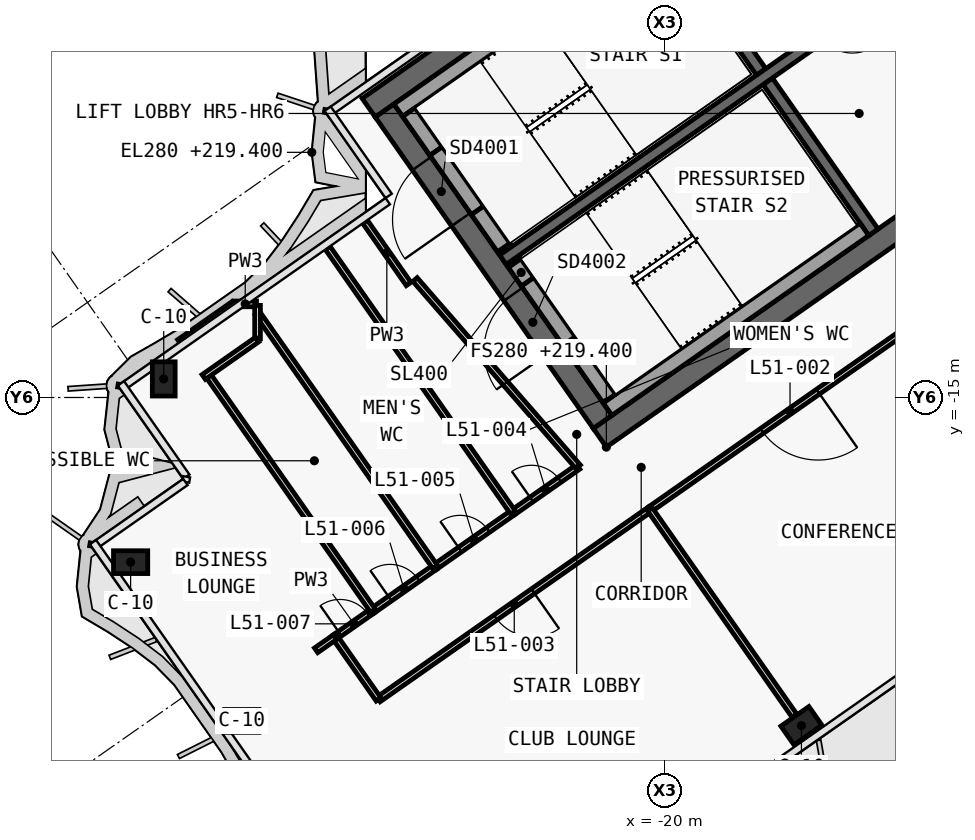
"""IFC4 building model, lengths in metres.
Left out: names, types, materials, properties, quantities, classifications, styles, units other than length and angle.
Written with IfcOpenShell. Run it as: python <this file> out.ifc"""

import sys

from ifc_helpers import new_model, si_unit, direction, frame, frame_2d, origin, origin_2d, place, context, subcontext, project, spatial, polyline, rectangle, outline, extrude, clip, halfspace, element, fill, save


model = new_model("IFC4")
c1 = context("Model", 3, precision=1e-05, world=origin(), true_north=direction((0.0, 1.0)))
c2 = subcontext(c1, "Body", "Model", "MODEL_VIEW")
j1 = project(units=[si_unit("LENGTHUNIT", "METRE"), si_unit("PLANEANGLEUNIT", "RADIAN")], contexts=[c1])
p1 = place(None, origin())
s1 = spatial("IfcSite", under=j1, at=p1, CompositionType="ELEMENT")
p2 = place(p1, origin())
s2 = spatial("IfcBuilding", under=s1, at=p2, CompositionType="ELEMENT")
p3 = place(p2, frame((0.0, 0.0, 219.4)))
s3 = spatial("IfcBuildingStorey", under=s2, at=p3, CompositionType="ELEMENT", Elevation=219.4)
p4 = place(p3, frame((-0.028, 12.066, 0.0), z_axis=(0.0, 0.0, 1.0), x_axis=(-0.819151382952, -0.573577380837, 0.0)))
e1 = element("IfcWall", 1, at=p4, inside=s3, PredefinedType="SHEAR", context=c2, shape_type="SweptSolid", body=[
    extrude(outline(polyline([(33.898, 0.3), (0.42, 0.3), (0.0, -0.3), (33.898, -0.3), (33.898, 0.3)])), origin(), (0.0, 0.0, 1.0), 6.0),
])
p5 = place(p3, frame((-0.028, -0.874, 0.0), z_axis=(0.0, 0.0, 1.0), x_axis=(-0.819150035022, -0.573579305871, 0.0)))
e2 = element("IfcWall", 2, at=p5, inside=s3, PredefinedType="SHEAR", context=c2, shape_type="SweptSolid", body=[
    extrude(outline(polyline([(26.476, 0.3), (0.42, 0.3), (0.0, -0.3), (26.476, -0.3), (26.476, 0.3)])), origin(), (0.0, 0.0, 1.0), 6.0),
])
p6 = place(p5, frame((2.976, 0.0, 0.0)))
e3 = element("IfcOpeningElement", 3, at=p6, cuts=e2, PredefinedType="OPENING", context=c2, shape_type="SweptSolid", body=[
    extrude(rectangle(XDim=2.4, YDim=2.1, at=frame_2d((1.2, 1.05))), frame((0.0, 0.31, 0.0), z_axis=(0.0, -1.0, 0.0), x_axis=(1.0, 0.0, 0.0)), (0.0, 0.0, 1.0), 0.62),
])
p7 = place(p5, frame((11.776, 0.0, 0.0)))
e4 = element("IfcOpeningElement", 4, at=p7, cuts=e2, PredefinedType="OPENING", context=c2, shape_type="SweptSolid", body=[
    extrude(rectangle(XDim=2.4, YDim=2.1, at=frame_2d((1.2, 1.05))), frame((0.0, 0.31, 0.0), z_axis=(0.0, -1.0, 0.0), x_axis=(1.0, 0.0, 0.0)), (0.0, 0.0, 1.0), 0.62),
])
p8 = place(p3, frame((-21.642, -15.642, 0.0), z_axis=(0.0, 0.0, 1.0), x_axis=(-0.573586866468, 0.819144740944, 0.0)))
e5 = element("IfcWall", 5, at=p8, inside=s3, PredefinedType="SHEAR", context=c2, shape_type="SweptSolid", body=[
    extrude(outline(polyline([(0.0, 0.3), (0.0, -0.3), (10.0, -0.3), (10.0, 0.3), (0.0, 0.3)])), origin(), (0.0, 0.0, 1.0), 6.0),
])
p9 = place(p8, frame((6.5, 0.0, 0.0)))
e6 = element("IfcOpeningElement", 6, at=p9, cuts=e5, PredefinedType="OPENING", context=c2, shape_type="SweptSolid", body=[
    extrude(rectangle(XDim=1.8, YDim=2.1, at=frame_2d((0.9, 1.05))), frame((0.0, 0.31, 0.0), z_axis=(0.0, -1.0, 0.0), x_axis=(1.0, 0.0, 0.0)), (0.0, 0.0, 1.0), 0.62),
])
p10 = place(p8, frame((2.3, 0.0, 0.0)))
e7 = element("IfcOpeningElement", 7, at=p10, cuts=e5, PredefinedType="OPENING", context=c2, shape_type="SweptSolid", body=[
    extrude(rectangle(XDim=1.8, YDim=2.1, at=frame_2d((0.9, 1.05))), frame((0.0, 0.31, 0.0), z_axis=(0.0, -1.0, 0.0), x_axis=(1.0, 0.0, 0.0)), (0.0, 0.0, 1.0), 0.62),
])
p11 = place(p3, frame((-14.515, -10.652, 0.0), z_axis=(0.0, 0.0, 1.0), x_axis=(-0.573560315113, 0.819163332265, 0.0)))
e8 = element("IfcWall", 8, at=p11, inside=s3, PredefinedType="SHEAR", context=c2, shape_type="SweptSolid", body=[
    extrude(outline(polyline([(4.85, 0.15), (0.0, 0.15), (0.0, -0.15), (4.85, -0.15), (4.85, 0.15)])), origin(), (0.0, 0.0, 1.0), 6.0),
])
p12 = place(p3, frame((-17.469, -6.433, 0.0), z_axis=(0.0, 0.0, 1.0), x_axis=(-0.573594092424, 0.81913968109, 0.0)))
e9 = element("IfcWall", 9, at=p12, inside=s3, PredefinedType="SHEAR", context=c2, shape_type="SweptSolid", body=[
    extrude(outline(polyline([(4.85, -0.15), (4.85, 0.15), (0.0, 0.15), (0.0, -0.15), (4.85, -0.15)])), origin(), (0.0, 0.0, 1.0), 6.0),
])
p13 = place(p3, frame((-2.638, 3.768, 0.0), z_axis=(0.0, 0.0, 1.0), x_axis=(-0.819155014212, -0.573572194837, 0.0)))
e10 = element("IfcWall", 10, at=p13, inside=s3, PredefinedType="SHEAR", context=c2, shape_type="SweptSolid", body=[
    extrude(outline(polyline([(26.4, 0.15), (0.0, 0.15), (0.0, -0.15), (26.4, -0.15), (26.4, 0.15)])), origin(), (0.0, 0.0, 1.0), 6.0),
])
p14 = place(p13, frame((1.169, 0.0, 0.0)))
e11 = element("IfcOpeningElement", 11, at=p14, cuts=e10, PredefinedType="OPENING", context=c2, shape_type="SweptSolid", body=[
    extrude(rectangle(XDim=1.1, YDim=2.1, at=frame_2d((0.55, 1.05))), frame((0.0, 0.16, 0.0), z_axis=(0.0, -1.0, 0.0), x_axis=(1.0, 0.0, 0.0)), (0.0, 0.0, 1.0), 0.32),
])
p15 = place(p13, frame((3.206, 0.0, 0.0)))
e12 = element("IfcOpeningElement", 12, at=p15, cuts=e10, PredefinedType="OPENING", context=c2, shape_type="SweptSolid", body=[
    extrude(rectangle(XDim=1.1, YDim=2.1, at=frame_2d((0.55, 1.05))), frame((0.0, 0.16, 0.0), z_axis=(0.0, -1.0, 0.0), x_axis=(1.0, 0.0, 0.0)), (0.0, 0.0, 1.0), 0.32),
])
p16 = place(p13, frame((5.244, 0.0, 0.0)))
e13 = element("IfcOpeningElement", 13, at=p16, cuts=e10, PredefinedType="OPENING", context=c2, shape_type="SweptSolid", body=[
    extrude(rectangle(XDim=1.1, YDim=2.1, at=frame_2d((0.55, 1.05))), frame((0.0, 0.16, 0.0), z_axis=(0.0, -1.0, 0.0), x_axis=(1.0, 0.0, 0.0)), (0.0, 0.0, 1.0), 0.32),
])
p17 = place(p13, frame((7.281, 0.0, 0.0)))
e14 = element("IfcOpeningElement", 14, at=p17, cuts=e10, PredefinedType="OPENING", context=c2, shape_type="SweptSolid", body=[
    extrude(rectangle(XDim=1.1, YDim=2.1, at=frame_2d((0.55, 1.05))), frame((0.0, 0.16, 0.0), z_axis=(0.0, -1.0, 0.0), x_axis=(1.0, 0.0, 0.0)), (0.0, 0.0, 1.0), 0.32),
])
p18 = place(p13, frame((9.688, 0.0, 0.0)))
e15 = element("IfcOpeningElement", 15, at=p18, cuts=e10, PredefinedType="OPENING", context=c2, shape_type="SweptSolid", body=[
    extrude(rectangle(XDim=1.1, YDim=2.1, at=frame_2d((0.55, 1.05))), frame((0.0, 0.16, 0.0), z_axis=(0.0, -1.0, 0.0), x_axis=(1.0, 0.0, 0.0)), (0.0, 0.0, 1.0), 0.32),
])
p19 = place(p13, frame((11.863, 0.0, 0.0)))
e16 = element("IfcOpeningElement", 16, at=p19, cuts=e10, PredefinedType="OPENING", context=c2, shape_type="SweptSolid", body=[
    extrude(rectangle(XDim=1.1, YDim=2.1, at=frame_2d((0.55, 1.05))), frame((0.0, 0.16, 0.0), z_axis=(0.0, -1.0, 0.0), x_axis=(1.0, 0.0, 0.0)), (0.0, 0.0, 1.0), 0.32),
])
p20 = place(p13, frame((15.175, 0.0, 0.0)))
e17 = element("IfcOpeningElement", 17, at=p20, cuts=e10, PredefinedType="OPENING", context=c2, shape_type="SweptSolid", body=[
    extrude(rectangle(XDim=1.0, YDim=2.1, at=frame_2d((0.5, 1.05))), frame((0.0, 0.16, 0.0), z_axis=(0.0, -1.0, 0.0), x_axis=(1.0, 0.0, 0.0)), (0.0, 0.0, 1.0), 0.32),
])
p21 = place(p3, frame((-16.41, -23.637, 0.0), z_axis=(0.0, 0.0, 1.0), x_axis=(-0.819152044289, -0.573576436351, 0.0)))
e18 = element("IfcColumn", 18, at=p21, inside=s3, PredefinedType="COLUMN", context=c2, shape_type="SweptSolid", body=[
    extrude(rectangle(XDim=0.9, YDim=0.6, at=origin_2d()), origin(), (0.0, 0.0, 1.0), 6.0),
])
p22 = place(p3, frame((-33.263, -14.562, 0.0), z_axis=(0.346416621851, 0.242558564294, 0.906179268684), x_axis=(-0.742303599802, -0.519755935718, 0.422893760899)))
e19 = element("IfcColumn", 19, at=p22, inside=s3, PredefinedType="COLUMN", context=c2, shape_type="Clipping", body=[
    clip(clip(extrude(rectangle(XDim=0.9, YDim=0.6, at=origin_2d()), origin(), (0.0, 0.0, 1.0), 6.621), halfspace(frame((0.0, 0.0, 0.21), z_axis=(0.0, 0.0, 1.0), x_axis=(1.0, 0.0, 0.0)), True)), halfspace(frame((0.0, 0.0, 6.411), z_axis=(0.0, 0.0, 1.0), x_axis=(1.0, 0.0, 0.0)), False)),
])
p23 = place(p3, frame((-31.185, -23.545, 0.0), z_axis=(0.346424451196, 0.242551016063, 0.906178296044), x_axis=(-0.573547881563, 0.819172037825, 0.0)))
e20 = element("IfcColumn", 20, at=p23, inside=s3, PredefinedType="COLUMN", context=c2, shape_type="Clipping", body=[
    clip(clip(extrude(rectangle(XDim=0.9, YDim=0.6, at=origin_2d()), origin(), (0.0, 0.0, 1.0), 6.621), halfspace(frame((0.0, 0.0, 0.14), z_axis=(0.0, 0.0, 1.0), x_axis=(1.0, 0.0, 0.0)), True)), halfspace(frame((0.0, 0.0, 6.481), z_axis=(0.0, 0.0, 1.0), x_axis=(1.0, 0.0, 0.0)), False)),
])
p24 = place(p3, frame((-34.11, -19.367, 0.0), z_axis=(0.346390570757, 0.242554250947, 0.906190381674), x_axis=(-0.573590657386, 0.819142086429, 0.0)))
e21 = element("IfcColumn", 21, at=p24, inside=s3, PredefinedType="COLUMN", context=c2, shape_type="Clipping", body=[
    clip(clip(extrude(rectangle(XDim=0.9, YDim=0.6, at=origin_2d()), origin(), (0.0, 0.0, 1.0), 6.621), halfspace(frame((0.0, 0.0, 0.14), z_axis=(0.0, 0.0, 1.0), x_axis=(1.0, 0.0, 0.0)), True)), halfspace(frame((0.0, 0.0, 6.481), z_axis=(0.0, 0.0, 1.0), x_axis=(1.0, 0.0, 0.0)), False)),
])
p25 = place(p3, frame((-20.259, -2.71, 0.0), z_axis=(0.0, 0.0, 1.0), x_axis=(-0.81914849389, -0.573581506813, 0.0)))
e22 = element("IfcWall", 22, at=p25, inside=s3, PredefinedType="SOLIDWALL", context=c2, shape_type="SweptSolid", body=[
    extrude(rectangle(XDim=8.25, YDim=0.4, at=frame_2d((4.125, 0.0))), origin(), (0.0, 0.0, 1.0), 5.72),
])
p26 = place(p3, frame((-24.244, -11.055, 0.0), z_axis=(0.0, 0.0, 1.0), x_axis=(-0.573571582932, 0.819155442668, 0.0)))
e23 = element("IfcWall", 23, at=p26, inside=s3, PredefinedType="SOLIDWALL", context=c2, shape_type="SweptSolid", body=[
    extrude(rectangle(XDim=1.2, YDim=0.4, at=frame_2d((0.6, 0.0))), origin(), (0.0, 0.0, 1.0), 5.72),
])
p27 = place(p3, frame((-26.022, -8.515, 0.0), z_axis=(0.0, 0.0, 1.0), x_axis=(-0.573619628835, 0.819121798889, 0.0)))
e24 = element("IfcWall", 24, at=p27, inside=s3, PredefinedType="SOLIDWALL", context=c2, shape_type="SweptSolid", body=[
    extrude(rectangle(XDim=1.25, YDim=0.4, at=frame_2d((0.625, 0.0))), origin(), (0.0, 0.0, 1.0), 5.72),
])
p28 = place(p3, frame((-24.932, -10.072, 2.15), z_axis=(0.0, 0.0, 1.0), x_axis=(-0.573591692345, 0.819141361715, 0.0)))
e25 = element("IfcWall", 25, at=p28, inside=s3, PredefinedType="SOLIDWALL", context=c2, shape_type="SweptSolid", body=[
    extrude(rectangle(XDim=1.9, YDim=0.4, at=frame_2d((0.95, 0.0))), origin(), (0.0, 0.0, 1.0), 3.57),
])
p29 = place(p3, frame((-14.753, -10.574, 0.0), z_axis=(0.0, 0.0, 1.0), x_axis=(-0.819158229677, -0.573567602601, 0.0)))
e26 = element("IfcWall", 26, at=p29, inside=s3, PredefinedType="SOLIDWALL", context=c2, shape_type="SweptSolid", body=[
    extrude(rectangle(XDim=8.25, YDim=0.4, at=frame_2d((4.125, 0.0))), origin(), (0.0, 0.0, 1.0), 5.72),
])
p30 = place(p3, frame((-21.462, -15.028, 0.0), z_axis=(0.0, 0.0, 1.0), x_axis=(-0.573559770908, 0.819163713305, 0.0)))
e27 = element("IfcWall", 27, at=p30, inside=s3, PredefinedType="SOLIDWALL", context=c2, shape_type="SweptSolid", body=[
    extrude(rectangle(XDim=1.85, YDim=0.4, at=frame_2d((0.925, 0.0))), origin(), (0.0, 0.0, 1.0), 5.72),
])
p31 = place(p3, frame((-23.613, -11.956, 0.0), z_axis=(0.0, 0.0, 1.0), x_axis=(-0.573435029941, 0.819251039936, 0.0)))
e28 = element("IfcWall", 28, at=p31, inside=s3, PredefinedType="SOLIDWALL", context=c2, shape_type="SweptSolid", body=[
    extrude(rectangle(XDim=0.6, YDim=0.4, at=frame_2d((0.3, 0.0))), origin(), (0.0, 0.0, 1.0), 5.72),
])
p32 = place(p3, frame((-22.523, -13.512, 2.15), z_axis=(0.0, 0.0, 1.0), x_axis=(-0.573591692345, 0.819141361715, 0.0)))
e29 = element("IfcWall", 29, at=p32, inside=s3, PredefinedType="SOLIDWALL", context=c2, shape_type="SweptSolid", body=[
    extrude(rectangle(XDim=1.9, YDim=0.4, at=frame_2d((0.95, 0.0))), origin(), (0.0, 0.0, 1.0), 3.57),
])
p33 = place(p3, frame((-24.003, -18.028, 0.0), z_axis=(0.0, 0.0, 1.0), x_axis=(0.819182738768, 0.573532597595, 0.0)))
e30 = element("IfcWall", 30, at=p33, inside=s3, PredefinedType="PARTITIONING", context=c2, shape_type="SweptSolid", body=[
    extrude(rectangle(XDim=2.099, YDim=0.15, at=frame_2d((1.05, 0.0))), origin(), (0.0, 0.0, 1.0), 5.72),
])
p34 = place(p33, frame((0.6, 0.0, 0.0)))
e31 = element("IfcOpeningElement", 31, at=p34, cuts=e30, PredefinedType="OPENING", context=c2, shape_type="SweptSolid", body=[
    extrude(rectangle(XDim=0.9, YDim=2.1, at=frame_2d((0.45, 1.05))), frame((0.0, 0.085, 0.0), z_axis=(0.0, -1.0, 0.0), x_axis=(1.0, 0.0, 0.0)), (0.0, 0.0, 1.0), 0.17),
])
p35 = place(p3, frame((-26.051, -19.461, 0.0), z_axis=(0.0, 0.0, 1.0), x_axis=(0.81920443604, 0.573501605902, 0.0)))
e32 = element("IfcWall", 32, at=p35, inside=s3, PredefinedType="PARTITIONING", context=c2, shape_type="SweptSolid", body=[
    extrude(rectangle(XDim=2.504, YDim=0.15, at=frame_2d((1.252, 0.0))), origin(), (0.0, 0.0, 1.0), 5.72),
])
p36 = place(p35, frame((0.802, 0.0, 0.0)))
e33 = element("IfcOpeningElement", 33, at=p36, cuts=e32, PredefinedType="OPENING", context=c2, shape_type="SweptSolid", body=[
    extrude(rectangle(XDim=0.9, YDim=2.1, at=frame_2d((0.45, 1.05))), frame((0.0, 0.085, 0.0), z_axis=(0.0, -1.0, 0.0), x_axis=(1.0, 0.0, 0.0)), (0.0, 0.0, 1.0), 0.17),
])
p37 = place(p3, frame((-27.689, -20.609, 0.0), z_axis=(0.0, 0.0, 1.0), x_axis=(0.819163233777, 0.573560455774, 0.0)))
e34 = element("IfcWall", 34, at=p37, inside=s3, PredefinedType="PARTITIONING", context=c2, shape_type="SweptSolid", body=[
    extrude(rectangle(XDim=2.004, YDim=0.15, at=frame_2d((1.002, 0.0))), origin(), (0.0, 0.0, 1.0), 5.15),
])
p38 = place(p37, frame((0.552, 0.0, 0.0)))
e35 = element("IfcOpeningElement", 35, at=p38, cuts=e34, PredefinedType="OPENING", context=c2, shape_type="SweptSolid", body=[
    extrude(rectangle(XDim=0.9, YDim=2.1, at=frame_2d((0.45, 1.05))), frame((0.0, 0.085, 0.0), z_axis=(0.0, -1.0, 0.0), x_axis=(1.0, 0.0, 0.0)), (0.0, 0.0, 1.0), 0.17),
])
p39 = place(p3, frame((-28.685, -21.306, 0.0), z_axis=(0.0, 0.0, 1.0), x_axis=(0.819184927295, 0.573529471686, 0.0)))
e36 = element("IfcWall", 36, at=p39, inside=s3, PredefinedType="PARTITIONING", context=c2, shape_type="SweptSolid", body=[
    extrude(rectangle(XDim=1.22, YDim=0.15, at=frame_2d((0.61, 0.0))), origin(), (0.0, 0.0, 1.0), 5.72),
])
p40 = place(p39, frame((0.16, 0.0, 0.0)))
e37 = element("IfcOpeningElement", 37, at=p40, cuts=e36, PredefinedType="OPENING", context=c2, shape_type="SweptSolid", body=[
    extrude(rectangle(XDim=0.9, YDim=2.1, at=frame_2d((0.45, 1.05))), frame((0.0, 0.085, 0.0), z_axis=(0.0, -1.0, 0.0), x_axis=(1.0, 0.0, 0.0)), (0.0, 0.0, 1.0), 0.17),
])
p41 = place(p3, frame((-13.022, -12.781, 0.0), z_axis=(0.0, 0.0, 1.0), x_axis=(-0.819142740634, -0.573589723117, 0.0)))
e38 = element("IfcWall", 38, at=p41, inside=s3, PredefinedType="PARTITIONING", context=c2, shape_type="SweptSolid", body=[
    extrude(rectangle(XDim=9.004, YDim=0.15, at=frame_2d((4.502, 0.0))), origin(), (0.0, 0.0, 1.0), 5.15),
])
p42 = place(p41, frame((3.602, 0.0, 0.0)))
e39 = element("IfcOpeningElement", 39, at=p42, cuts=e38, PredefinedType="OPENING", context=c2, shape_type="SweptSolid", body=[
    extrude(rectangle(XDim=1.8, YDim=2.4, at=frame_2d((0.9, 1.2))), frame((0.0, 0.085, 0.0), z_axis=(0.0, -1.0, 0.0), x_axis=(1.0, 0.0, 0.0)), (0.0, 0.0, 1.0), 0.17),
])
p43 = place(p3, frame((-20.395, -17.943, 0.0), z_axis=(0.0, 0.0, 1.0), x_axis=(-0.81914378826, -0.573588227002, 0.0)))
e40 = element("IfcWall", 40, at=p43, inside=s3, PredefinedType="PARTITIONING", context=c2, shape_type="SweptSolid", body=[
    extrude(rectangle(XDim=8.72, YDim=0.15, at=frame_2d((4.36, 0.0))), origin(), (0.0, 0.0, 1.0), 5.15),
])
p44 = place(p43, frame((3.76, 0.0, 0.0)))
e41 = element("IfcOpeningElement", 41, at=p44, cuts=e40, PredefinedType="OPENING", context=c2, shape_type="SweptSolid", body=[
    extrude(rectangle(XDim=1.2, YDim=2.4, at=frame_2d((0.6, 1.2))), frame((0.0, 0.085, 0.0), z_axis=(0.0, -1.0, 0.0), x_axis=(1.0, 0.0, 0.0)), (0.0, 0.0, 1.0), 0.17),
])
for number, where, z_axis, x_axis in (
    (42, (-27.538, -22.945, 0.0), (0.0, 0.0, 1.0), (-0.574, 0.819, 0.0)),
    (43, (-26.746, -12.014, 0.0), (0.0, 0.0, 1.0), (-0.574, 0.819, 0.0)),
):
    element("IfcWall", number, at=place(p3, frame(where, z_axis=z_axis, x_axis=x_axis)), inside=s3, PredefinedType="PARTITIONING", context=c2, shape_type="SweptSolid", body=[
        extrude(rectangle(XDim=2.0, YDim=0.15, at=frame_2d((1.0, 0.0))), origin(), (0.0, 0.0, 1.0), 5.15),
    ])
p45 = place(p3, frame((-22.284, -16.826, 0.0), z_axis=(0.0, 0.0, 1.0), x_axis=(-0.656758142177, 0.754101281449, 0.0)))
e44 = element("IfcWall", 44, at=p45, inside=s3, PredefinedType="PARTITIONING", context=c2, shape_type="SweptSolid", body=[
    extrude(rectangle(XDim=6.539, YDim=0.15, at=frame_2d((3.269, 0.0))), origin(), (0.0, 0.0, 1.0), 5.72),
])
p46 = place(p3, frame((-24.001, -18.026, 0.0), z_axis=(0.0, 0.0, 1.0), x_axis=(-0.573591492816, 0.819141501433, 0.0)))
e45 = element("IfcWall", 45, at=p46, inside=s3, PredefinedType="PARTITIONING", context=c2, shape_type="SweptSolid", body=[
    extrude(rectangle(XDim=8.5, YDim=0.15, at=frame_2d((4.25, 0.0))), origin(), (0.0, 0.0, 1.0), 5.15),
])
p47 = place(p3, frame((-26.049, -19.46, 0.0), z_axis=(0.0, 0.0, 1.0), x_axis=(-0.57357898468, 0.819150259924, 0.0)))
e46 = element("IfcWall", 46, at=p47, inside=s3, PredefinedType="PARTITIONING", context=c2, shape_type="SweptSolid", body=[
    extrude(rectangle(XDim=8.147, YDim=0.15, at=frame_2d((4.074, 0.0))), origin(), (0.0, 0.0, 1.0), 5.15),
])
p48 = place(p3, frame((-27.687, -20.607, 0.0), z_axis=(0.0, 0.0, 1.0), x_axis=(-0.573574606891, 0.819153325288, 0.0)))
e47 = element("IfcWall", 47, at=p48, inside=s3, PredefinedType="PARTITIONING", context=c2, shape_type="SweptSolid", body=[
    extrude(rectangle(XDim=7.589, YDim=0.15, at=frame_2d((3.795, 0.0))), origin(), (0.0, 0.0, 1.0), 5.1),
])
p49 = place(p3, frame((-32.781, -13.541, 0.0), z_axis=(0.0, 0.0, 1.0), x_axis=(0.819139782198, 0.573593948034, 0.0)))
e48 = element("IfcWall", 48, at=p49, inside=s3, PredefinedType="PARTITIONING", context=c2, shape_type="SweptSolid", body=[
    extrude(rectangle(XDim=1.743, YDim=0.15, at=frame_2d((0.872, 0.0))), origin(), (0.0, 0.0, 1.0), 5.72),
])
p50 = place(p3, frame((-31.342, -12.537, 0.0), z_axis=(0.0, 0.0, 1.0), x_axis=(1.0, 0.0, 0.0)))
e49 = element("IfcWall", 49, at=p50, inside=s3, PredefinedType="PARTITIONING", context=c2, shape_type="SweptSolid", body=[
    extrude(rectangle(XDim=0.592, YDim=0.15, at=frame_2d((0.296, 0.0))), origin(), (0.0, 0.0, 1.0), 5.15),
])
p51 = place(p3, frame((-30.722, -12.577, 0.0), z_axis=(0.0, 0.0, 1.0), x_axis=(0.0, -1.0, 0.0)))
e50 = element("IfcWall", 50, at=p51, inside=s3, PredefinedType="PARTITIONING", context=c2, shape_type="SweptSolid", body=[
    extrude(rectangle(XDim=0.88, YDim=0.15, at=frame_2d((0.44, 0.0))), origin(), (0.0, 0.0, 1.0), 5.15),
])
p52 = place(p3, frame((-30.73, -13.474, 0.0), z_axis=(0.0, 0.0, 1.0), x_axis=(-0.819091771691, -0.573662504918, 0.0)))
e51 = element("IfcWall", 51, at=p52, inside=s3, PredefinedType="PARTITIONING", context=c2, shape_type="SweptSolid", body=[
    extrude(rectangle(XDim=1.719, YDim=0.15, at=frame_2d((0.859, 0.0))), origin(), (0.0, 0.0, 1.0), 5.1),
])
p53 = place(p3, frame((-28.684, -21.306, 0.0), z_axis=(0.0, 0.0, 1.0), x_axis=(-0.819307682984, -0.573354097049, 0.0)))
e52 = element("IfcWall", 52, at=p53, inside=s3, PredefinedType="PARTITIONING", context=c2, shape_type="SweptSolid", body=[
    extrude(rectangle(XDim=0.605, YDim=0.15, at=frame_2d((0.303, 0.0))), origin(), (0.0, 0.0, 1.0), 5.72),
])
p54 = place(p3, frame((-16.594, -23.375, 0.0), z_axis=(0.0, 0.0, 1.0), x_axis=(-0.57359826181, 0.819136761505, 0.0)))
e53 = element("IfcWall", 53, at=p54, inside=s3, PredefinedType="PARTITIONING", context=c2, shape_type="SweptSolid", body=[
    extrude(rectangle(XDim=6.63, YDim=0.15, at=frame_2d((3.315, 0.0))), origin(), (0.0, 0.0, 1.0), 5.15),
])
p55 = place(p9, origin())
e54 = element("IfcDoor", 54, at=p55, inside=s3, OperationType="DOUBLE_DOOR_SINGLE_SWING", PredefinedType="DOOR", context=c2, shape_type="SweptSolid", body=[
    extrude(rectangle(XDim=1.8, YDim=2.1, at=frame_2d((0.9, 1.05))), frame((0.0, 0.025, 0.0), z_axis=(0.0, -1.0, 0.0), x_axis=(1.0, 0.0, 0.0)), (0.0, 0.0, 1.0), 0.05),
])
fill(e6, e54)
p56 = place(p10, origin())
e55 = element("IfcDoor", 55, at=p56, inside=s3, OperationType="DOUBLE_DOOR_SINGLE_SWING", PredefinedType="DOOR", context=c2, shape_type="SweptSolid", body=[
    extrude(rectangle(XDim=1.8, YDim=2.1, at=frame_2d((0.9, 1.05))), frame((0.0, 0.025, 0.0), z_axis=(0.0, -1.0, 0.0), x_axis=(1.0, 0.0, 0.0)), (0.0, 0.0, 1.0), 0.05),
])
fill(e7, e55)
p57 = place(p42, origin())
e56 = element("IfcDoor", 56, at=p57, inside=s3, OperationType="DOUBLE_DOOR_SINGLE_SWING", PredefinedType="DOOR", context=c2, shape_type="SweptSolid", body=[
    extrude(rectangle(XDim=1.8, YDim=2.4, at=frame_2d((0.9, 1.2))), frame((0.0, 0.025, 0.0), z_axis=(0.0, -1.0, 0.0), x_axis=(1.0, 0.0, 0.0)), (0.0, 0.0, 1.0), 0.05),
])
fill(e39, e56)
p58 = place(p44, origin())
e57 = element("IfcDoor", 57, at=p58, inside=s3, OperationType="DOUBLE_DOOR_SINGLE_SWING", PredefinedType="DOOR", context=c2, shape_type="SweptSolid", body=[
    extrude(rectangle(XDim=1.2, YDim=2.4, at=frame_2d((0.6, 1.2))), frame((0.0, 0.025, 0.0), z_axis=(0.0, -1.0, 0.0), x_axis=(1.0, 0.0, 0.0)), (0.0, 0.0, 1.0), 0.05),
])
fill(e41, e57)
p59 = place(p34, origin())
e58 = element("IfcDoor", 58, at=p59, inside=s3, OperationType="SINGLE_SWING_RIGHT", PredefinedType="DOOR", context=c2, shape_type="SweptSolid", body=[
    extrude(rectangle(XDim=0.9, YDim=2.1, at=frame_2d((0.45, 1.05))), frame((0.0, 0.025, 0.0), z_axis=(0.0, -1.0, 0.0), x_axis=(1.0, 0.0, 0.0)), (0.0, 0.0, 1.0), 0.05),
])
fill(e31, e58)
p60 = place(p36, origin())
e59 = element("IfcDoor", 59, at=p60, inside=s3, OperationType="SINGLE_SWING_RIGHT", PredefinedType="DOOR", context=c2, shape_type="SweptSolid", body=[
    extrude(rectangle(XDim=0.9, YDim=2.1, at=frame_2d((0.45, 1.05))), frame((0.0, 0.025, 0.0), z_axis=(0.0, -1.0, 0.0), x_axis=(1.0, 0.0, 0.0)), (0.0, 0.0, 1.0), 0.05),
])
fill(e33, e59)
p61 = place(p38, origin())
e60 = element("IfcDoor", 60, at=p61, inside=s3, OperationType="SINGLE_SWING_RIGHT", PredefinedType="DOOR", context=c2, shape_type="SweptSolid", body=[
    extrude(rectangle(XDim=0.9, YDim=2.1, at=frame_2d((0.45, 1.05))), frame((0.0, 0.025, 0.0), z_axis=(0.0, -1.0, 0.0), x_axis=(1.0, 0.0, 0.0)), (0.0, 0.0, 1.0), 0.05),
])
fill(e35, e60)
p62 = place(p40, origin())
e61 = element("IfcDoor", 61, at=p62, inside=s3, OperationType="SINGLE_SWING_LEFT", PredefinedType="DOOR", context=c2, shape_type="SweptSolid", body=[
    extrude(rectangle(XDim=0.9, YDim=2.1, at=frame_2d((0.45, 1.05))), frame((0.0, 0.025, 0.0), z_axis=(0.0, -1.0, 0.0), x_axis=(1.0, 0.0, 0.0)), (0.0, 0.0, 1.0), 0.05),
])
fill(e37, e61)
save(model, sys.argv[1])
